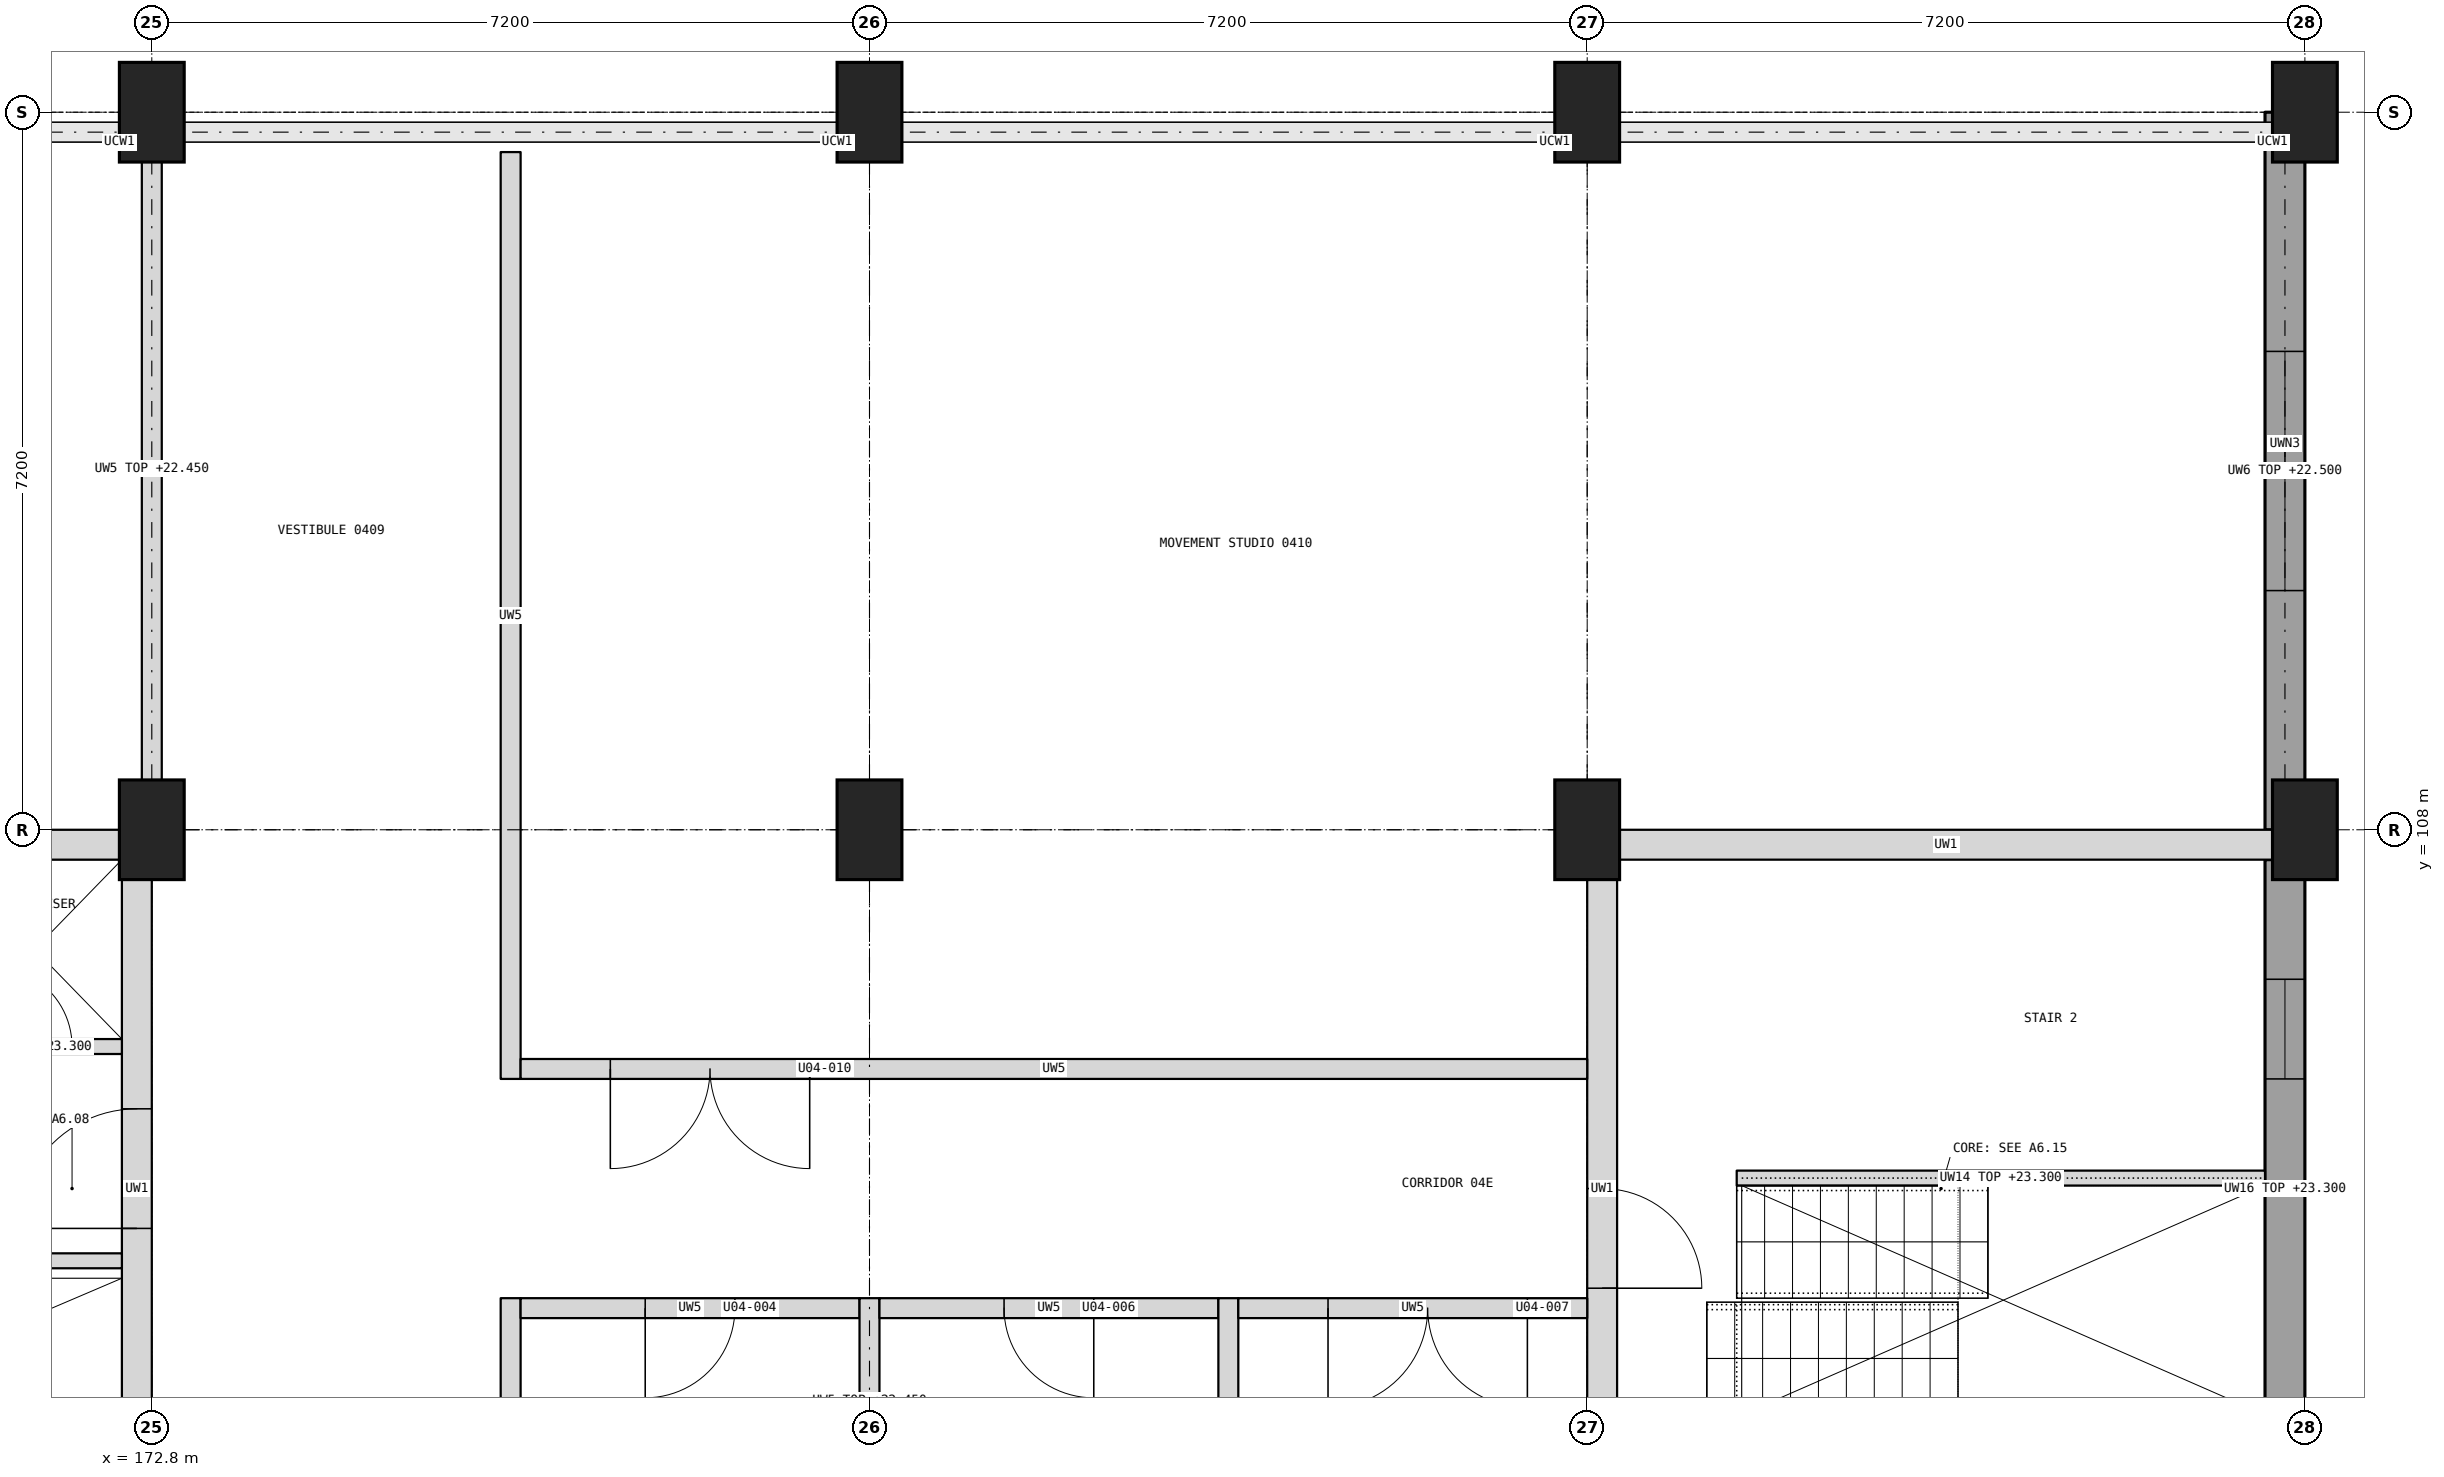
"""IFC4 building model, lengths in metres.
Left out: names, types, materials, properties, quantities, classifications, styles, units other than length and angle.
Written with IfcOpenShell. Run it as: python <this file> out.ifc"""

import sys

from ifc_helpers import new_model, si_unit, direction, frame, frame_2d, origin, origin_2d, place, context, subcontext, project, spatial, rectangle, extrude, element, fill, save


model = new_model("IFC4")
c1 = context("Model", 3, precision=1e-05, world=origin(), true_north=direction((0.0, 1.0)))
c2 = subcontext(c1, "Body", "Model", "MODEL_VIEW")
j1 = project(units=[si_unit("LENGTHUNIT", "METRE"), si_unit("PLANEANGLEUNIT", "RADIAN")], contexts=[c1])
p1 = place(None, origin())
s1 = spatial("IfcSite", under=j1, at=p1, CompositionType="ELEMENT")
p2 = place(p1, origin())
s2 = spatial("IfcBuilding", under=s1, at=p2, CompositionType="ELEMENT")
p3 = place(p2, frame((0.0, 0.0, 19.9)))
s3 = spatial("IfcBuildingStorey", under=s2, at=p3, CompositionType="ELEMENT", Elevation=19.9)
for number, where, z_axis, x_axis in (
    (1, (172.8, 108.0, 0.0), (0.0, 0.0, 1.0), (1.0, 0.0, 0.0)),
    (2, (172.8, 115.2, 0.0), (0.0, 0.0, 1.0), (1.0, 0.0, 0.0)),
    (3, (180.0, 108.0, 0.0), (0.0, 0.0, 1.0), (1.0, 0.0, 0.0)),
    (4, (180.0, 115.2, 0.0), (0.0, 0.0, 1.0), (1.0, 0.0, 0.0)),
    (5, (187.2, 108.0, 0.0), (0.0, 0.0, 1.0), (1.0, 0.0, 0.0)),
    (6, (187.2, 115.2, 0.0), (0.0, 0.0, 1.0), (1.0, 0.0, 0.0)),
    (7, (194.4, 108.0, 0.0), (0.0, 0.0, 1.0), (1.0, 0.0, 0.0)),
    (8, (194.4, 115.2, 0.0), (0.0, 0.0, 1.0), (1.0, 0.0, 0.0)),
):
    element("IfcColumn", number, at=place(p3, frame(where, z_axis=z_axis, x_axis=x_axis)), inside=s3, PredefinedType="COLUMN", context=c2, shape_type="SweptSolid", body=[
        extrude(rectangle(XDim=0.65, YDim=1.0, at=origin_2d()), origin(), (0.0, 0.0, 1.0), 3.4),
    ])
p4 = place(p3, frame((158.4, 107.85, 0.0), z_axis=(0.0, 0.0, 1.0), x_axis=(1.0, 0.0, 0.0)))
e9 = element("IfcWall", 9, at=p4, inside=s3, PredefinedType="SHEAR", context=c2, shape_type="SweptSolid", body=[
    extrude(rectangle(XDim=14.4, YDim=0.3, at=frame_2d((7.2, 0.0))), origin(), (0.0, 0.0, 1.0), 3.4),
])
p5 = place(p3, frame((172.65, 101.1, 0.0), z_axis=(0.0, 0.0, 1.0), x_axis=(0.0, 1.0, 0.0)))
e10 = element("IfcWall", 10, at=p5, inside=s3, PredefinedType="SHEAR", context=c2, shape_type="SweptSolid", body=[
    extrude(rectangle(XDim=6.6, YDim=0.3, at=frame_2d((3.3, 0.0))), origin(), (0.0, 0.0, 1.0), 3.4),
])
p6 = place(p5, frame((2.9, 0.0, 0.0)))
e11 = element("IfcOpeningElement", 11, at=p6, cuts=e10, PredefinedType="OPENING", context=c2, shape_type="SweptSolid", body=[
    extrude(rectangle(XDim=1.2, YDim=2.1, at=frame_2d((0.6, 1.05))), frame((0.0, 0.16, 0.0), z_axis=(0.0, -1.0, 0.0), x_axis=(1.0, 0.0, 0.0)), (0.0, 0.0, 1.0), 0.32),
])
p7 = place(p3, frame((165.75, 103.675, 0.0), z_axis=(0.0, 0.0, 1.0), x_axis=(1.0, 0.0, 0.0)))
e12 = element("IfcWall", 12, at=p7, inside=s3, PredefinedType="SHEAR", context=c2, shape_type="SweptSolid", body=[
    extrude(rectangle(XDim=6.75, YDim=0.15, at=frame_2d((3.375, 0.0))), origin(), (0.0, 0.0, 1.0), 3.4),
])
p8 = place(p7, frame((0.1, 0.0, 0.0)))
e13 = element("IfcOpeningElement", 13, at=p8, cuts=e12, PredefinedType="OPENING", context=c2, shape_type="SweptSolid", body=[
    extrude(rectangle(XDim=1.0, YDim=2.1, at=frame_2d((0.5, 1.05))), frame((0.0, 0.085, 0.0), z_axis=(0.0, -1.0, 0.0), x_axis=(1.0, 0.0, 0.0)), (0.0, 0.0, 1.0), 0.17),
])
p9 = place(p3, frame((170.75, 105.825, 0.0), z_axis=(0.0, 0.0, 1.0), x_axis=(1.0, 0.0, 0.0)))
e14 = element("IfcWall", 14, at=p9, inside=s3, PredefinedType="PARTITIONING", context=c2, shape_type="SweptSolid", body=[
    extrude(rectangle(XDim=1.75, YDim=0.15, at=frame_2d((0.875, 0.0))), origin(), (0.0, 0.0, 1.0), 3.4),
])
p10 = place(p9, frame((0.45, 0.0, 0.0)))
e15 = element("IfcOpeningElement", 15, at=p10, cuts=e14, PredefinedType="OPENING", context=c2, shape_type="SweptSolid", body=[
    extrude(rectangle(XDim=0.8, YDim=2.1, at=frame_2d((0.4, 1.05))), frame((0.0, 0.085, 0.0), z_axis=(0.0, -1.0, 0.0), x_axis=(1.0, 0.0, 0.0)), (0.0, 0.0, 1.0), 0.17),
])
p11 = place(p3, frame((194.4, 107.85, 0.0), z_axis=(0.0, 0.0, 1.0), x_axis=(-1.0, 0.0, 0.0)))
e16 = element("IfcWall", 16, at=p11, inside=s3, PredefinedType="SHEAR", context=c2, shape_type="SweptSolid", body=[
    extrude(rectangle(XDim=7.2, YDim=0.3, at=frame_2d((3.6, 0.0))), origin(), (0.0, 0.0, 1.0), 3.4),
])
p12 = place(p3, frame((187.35, 101.1, 0.0), z_axis=(0.0, 0.0, 1.0), x_axis=(0.0, 1.0, 0.0)))
e17 = element("IfcWall", 17, at=p12, inside=s3, PredefinedType="SHEAR", context=c2, shape_type="SweptSolid", body=[
    extrude(rectangle(XDim=6.6, YDim=0.3, at=frame_2d((3.3, 0.0))), origin(), (0.0, 0.0, 1.0), 3.4),
])
p13 = place(p12, frame((2.3, 0.0, 0.0)))
e18 = element("IfcOpeningElement", 18, at=p13, cuts=e17, PredefinedType="OPENING", context=c2, shape_type="SweptSolid", body=[
    extrude(rectangle(XDim=1.0, YDim=2.1, at=frame_2d((0.5, 1.05))), frame((0.0, 0.16, 0.0), z_axis=(0.0, -1.0, 0.0), x_axis=(1.0, 0.0, 0.0)), (0.0, 0.0, 1.0), 0.32),
])
p14 = place(p3, frame((194.2, 101.1, 0.0), z_axis=(0.0, 0.0, 1.0), x_axis=(0.0, 1.0, 0.0)))
e19 = element("IfcWall", 19, at=p14, inside=s3, PredefinedType="SHEAR", context=c2, shape_type="SweptSolid", body=[
    extrude(rectangle(XDim=6.6, YDim=0.4, at=frame_2d((3.3, 0.0))), origin(), (0.0, 0.0, 1.0), 3.4),
])
p15 = place(p14, frame((4.4, 0.0, 1.0)))
e20 = element("IfcOpeningElement", 20, at=p15, cuts=e19, PredefinedType="OPENING", context=c2, shape_type="SweptSolid", body=[
    extrude(rectangle(XDim=1.0, YDim=1.5, at=frame_2d((0.5, 0.75))), frame((0.0, 0.21, 0.0), z_axis=(0.0, -1.0, 0.0), x_axis=(1.0, 0.0, 0.0)), (0.0, 0.0, 1.0), 0.42),
])
p16 = place(p3, frame((188.7, 104.505, 0.0), z_axis=(0.0, 0.0, 1.0), x_axis=(1.0, 0.0, 0.0)))
e21 = element("IfcWall", 21, at=p16, inside=s3, PredefinedType="SHEAR", context=c2, shape_type="SweptSolid", body=[
    extrude(rectangle(XDim=5.3, YDim=0.15, at=frame_2d((2.65, 0.0))), origin(), (0.0, 0.0, 1.0), 3.4),
])
p17 = place(p3, frame((194.2, 108.0, 0.0), z_axis=(0.0, 0.0, 1.0), x_axis=(0.0, 1.0, 0.0)))
e22 = element("IfcWall", 22, at=p17, inside=s3, PredefinedType="SOLIDWALL", context=c2, shape_type="SweptSolid", body=[
    extrude(rectangle(XDim=7.2, YDim=0.4, at=frame_2d((3.6, 0.0))), origin(), (0.0, 0.0, 1.0), 2.6),
])
p18 = place(p17, frame((2.4, 0.0, 0.9)))
e23 = element("IfcOpeningElement", 23, at=p18, cuts=e22, PredefinedType="OPENING", context=c2, shape_type="SweptSolid", body=[
    extrude(rectangle(XDim=2.4, YDim=1.5, at=frame_2d((1.2, 0.75))), frame((0.0, 0.21, 0.0), z_axis=(0.0, -1.0, 0.0), x_axis=(1.0, 0.0, 0.0)), (0.0, 0.0, 1.0), 0.42),
])
p19 = place(p3, frame((176.4, 94.0, 0.0), z_axis=(0.0, 0.0, 1.0), x_axis=(0.0, 1.0, 0.0)))
e24 = element("IfcWall", 24, at=p19, inside=s3, PredefinedType="PARTITIONING", context=c2, shape_type="SweptSolid", body=[
    extrude(rectangle(XDim=9.3, YDim=0.2, at=frame_2d((4.65, 0.0))), origin(), (0.0, 0.0, 1.0), 3.1),
])
p20 = place(p3, frame((176.5, 103.2, 0.0), z_axis=(0.0, 0.0, 1.0), x_axis=(1.0, 0.0, 0.0)))
e25 = element("IfcWall", 25, at=p20, inside=s3, PredefinedType="PARTITIONING", context=c2, shape_type="SweptSolid", body=[
    extrude(rectangle(XDim=3.4, YDim=0.2, at=frame_2d((1.7, 0.0))), origin(), (0.0, 0.0, 1.0), 3.1),
])
p21 = place(p20, frame((1.25, 0.0, 0.0)))
e26 = element("IfcOpeningElement", 26, at=p21, cuts=e25, PredefinedType="OPENING", context=c2, shape_type="SweptSolid", body=[
    extrude(rectangle(XDim=0.9, YDim=2.1, at=frame_2d((0.45, 1.05))), frame((0.0, 0.11, 0.0), z_axis=(0.0, -1.0, 0.0), x_axis=(1.0, 0.0, 0.0)), (0.0, 0.0, 1.0), 0.22),
])
p22 = place(p3, frame((180.0, 101.25, 0.0), z_axis=(0.0, 0.0, 1.0), x_axis=(0.0, 1.0, 0.0)))
e27 = element("IfcWall", 27, at=p22, inside=s3, PredefinedType="PARTITIONING", context=c2, shape_type="SweptSolid", body=[
    extrude(rectangle(XDim=2.05, YDim=0.2, at=frame_2d((1.025, 0.0))), origin(), (0.0, 0.0, 1.0), 2.55),
])
p23 = place(p3, frame((180.1, 103.2, 0.0), z_axis=(0.0, 0.0, 1.0), x_axis=(1.0, 0.0, 0.0)))
e28 = element("IfcWall", 28, at=p23, inside=s3, PredefinedType="PARTITIONING", context=c2, shape_type="SweptSolid", body=[
    extrude(rectangle(XDim=3.4, YDim=0.2, at=frame_2d((1.7, 0.0))), origin(), (0.0, 0.0, 1.0), 3.1),
])
p24 = place(p23, frame((1.25, 0.0, 0.0)))
e29 = element("IfcOpeningElement", 29, at=p24, cuts=e28, PredefinedType="OPENING", context=c2, shape_type="SweptSolid", body=[
    extrude(rectangle(XDim=0.9, YDim=2.1, at=frame_2d((0.45, 1.05))), frame((0.0, 0.11, 0.0), z_axis=(0.0, -1.0, 0.0), x_axis=(1.0, 0.0, 0.0)), (0.0, 0.0, 1.0), 0.22),
])
p25 = place(p3, frame((183.6, 94.0, 0.0), z_axis=(0.0, 0.0, 1.0), x_axis=(0.0, 1.0, 0.0)))
e30 = element("IfcWall", 30, at=p25, inside=s3, PredefinedType="PARTITIONING", context=c2, shape_type="SweptSolid", body=[
    extrude(rectangle(XDim=9.3, YDim=0.2, at=frame_2d((4.65, 0.0))), origin(), (0.0, 0.0, 1.0), 3.1),
])
p26 = place(p3, frame((183.7, 103.2, 0.0), z_axis=(0.0, 0.0, 1.0), x_axis=(1.0, 0.0, 0.0)))
e31 = element("IfcWall", 31, at=p26, inside=s3, PredefinedType="PARTITIONING", context=c2, shape_type="SweptSolid", body=[
    extrude(rectangle(XDim=3.5, YDim=0.2, at=frame_2d((1.75, 0.0))), origin(), (0.0, 0.0, 1.0), 3.1),
])
p27 = place(p26, frame((0.9, 0.0, 0.0)))
e32 = element("IfcOpeningElement", 32, at=p27, cuts=e31, PredefinedType="OPENING", context=c2, shape_type="SweptSolid", body=[
    extrude(rectangle(XDim=2.0, YDim=2.1, at=frame_2d((1.0, 1.05))), frame((0.0, 0.11, 0.0), z_axis=(0.0, -1.0, 0.0), x_axis=(1.0, 0.0, 0.0)), (0.0, 0.0, 1.0), 0.22),
])
p28 = place(p3, frame((172.8, 108.45, 0.0), z_axis=(0.0, 0.0, 1.0), x_axis=(0.0, 1.0, 0.0)))
e33 = element("IfcWall", 33, at=p28, inside=s3, PredefinedType="PARTITIONING", context=c2, shape_type="SweptSolid", body=[
    extrude(rectangle(XDim=6.35, YDim=0.2, at=frame_2d((3.175, 0.0))), origin(), (0.0, 0.0, 1.0), 2.55),
])
p29 = place(p3, frame((176.4, 105.5, 0.0), z_axis=(0.0, 0.0, 1.0), x_axis=(0.0, 1.0, 0.0)))
e34 = element("IfcWall", 34, at=p29, inside=s3, PredefinedType="PARTITIONING", context=c2, shape_type="SweptSolid", body=[
    extrude(rectangle(XDim=9.3, YDim=0.2, at=frame_2d((4.65, 0.0))), origin(), (0.0, 0.0, 1.0), 3.1),
])
p30 = place(p3, frame((176.5, 105.6, 0.0), z_axis=(0.0, 0.0, 1.0), x_axis=(1.0, 0.0, 0.0)))
e35 = element("IfcWall", 35, at=p30, inside=s3, PredefinedType="PARTITIONING", context=c2, shape_type="SweptSolid", body=[
    extrude(rectangle(XDim=10.7, YDim=0.2, at=frame_2d((5.35, 0.0))), origin(), (0.0, 0.0, 1.0), 3.1),
])
p31 = place(p30, frame((0.9, 0.0, 0.0)))
e36 = element("IfcOpeningElement", 36, at=p31, cuts=e35, PredefinedType="OPENING", context=c2, shape_type="SweptSolid", body=[
    extrude(rectangle(XDim=2.0, YDim=2.1, at=frame_2d((1.0, 1.05))), frame((0.0, 0.11, 0.0), z_axis=(0.0, -1.0, 0.0), x_axis=(1.0, 0.0, 0.0)), (0.0, 0.0, 1.0), 0.22),
])
p32 = place(p18, origin())
e37 = element("IfcWindow", 37, at=p32, inside=s3, PartitioningType="DOUBLE_PANEL_VERTICAL", PredefinedType="WINDOW", context=c2, shape_type="SweptSolid", body=[
    extrude(rectangle(XDim=2.4, YDim=1.5, at=frame_2d((1.2, 0.75))), frame((0.0, 0.03, 0.0), z_axis=(0.0, -1.0, 0.0), x_axis=(1.0, 0.0, 0.0)), (0.0, 0.0, 1.0), 0.06),
])
fill(e23, e37)
p33 = place(p15, origin())
e38 = element("IfcWindow", 38, at=p33, inside=s3, PartitioningType="SINGLE_PANEL", PredefinedType="WINDOW", context=c2, shape_type="SweptSolid", body=[
    extrude(rectangle(XDim=1.0, YDim=1.5, at=frame_2d((0.5, 0.75))), frame((0.0, 0.03, 0.0), z_axis=(0.0, -1.0, 0.0), x_axis=(1.0, 0.0, 0.0)), (0.0, 0.0, 1.0), 0.06),
])
fill(e20, e38)
p34 = place(p21, frame((0.9, 0.0, 0.0), z_axis=(0.0, 0.0, 1.0), x_axis=(-1.0, 0.0, 0.0)))
e39 = element("IfcDoor", 39, at=p34, inside=s3, OperationType="SINGLE_SWING_RIGHT", PredefinedType="DOOR", context=c2, shape_type="SweptSolid", body=[
    extrude(rectangle(XDim=0.9, YDim=2.1, at=frame_2d((0.45, 1.05))), frame((0.0, 0.025, 0.0), z_axis=(0.0, -1.0, 0.0), x_axis=(1.0, 0.0, 0.0)), (0.0, 0.0, 1.0), 0.05),
])
fill(e26, e39)
p35 = place(p24, frame((0.9, 0.0, 0.0), z_axis=(0.0, 0.0, 1.0), x_axis=(-1.0, 0.0, 0.0)))
e40 = element("IfcDoor", 40, at=p35, inside=s3, OperationType="SINGLE_SWING_LEFT", PredefinedType="DOOR", context=c2, shape_type="SweptSolid", body=[
    extrude(rectangle(XDim=0.9, YDim=2.1, at=frame_2d((0.45, 1.05))), frame((0.0, 0.025, 0.0), z_axis=(0.0, -1.0, 0.0), x_axis=(1.0, 0.0, 0.0)), (0.0, 0.0, 1.0), 0.05),
])
fill(e29, e40)
p36 = place(p27, frame((2.0, 0.0, 0.0), z_axis=(0.0, 0.0, 1.0), x_axis=(-1.0, 0.0, 0.0)))
e41 = element("IfcDoor", 41, at=p36, inside=s3, OperationType="DOUBLE_DOOR_SINGLE_SWING", PredefinedType="DOOR", context=c2, shape_type="SweptSolid", body=[
    extrude(rectangle(XDim=2.0, YDim=2.1, at=frame_2d((1.0, 1.05))), frame((0.0, 0.025, 0.0), z_axis=(0.0, -1.0, 0.0), x_axis=(1.0, 0.0, 0.0)), (0.0, 0.0, 1.0), 0.05),
])
fill(e32, e41)
p37 = place(p31, frame((2.0, 0.0, 0.0), z_axis=(0.0, 0.0, 1.0), x_axis=(-1.0, 0.0, 0.0)))
e42 = element("IfcDoor", 42, at=p37, inside=s3, OperationType="DOUBLE_DOOR_SINGLE_SWING", PredefinedType="DOOR", context=c2, shape_type="SweptSolid", body=[
    extrude(rectangle(XDim=2.0, YDim=2.1, at=frame_2d((1.0, 1.05))), frame((0.0, 0.025, 0.0), z_axis=(0.0, -1.0, 0.0), x_axis=(1.0, 0.0, 0.0)), (0.0, 0.0, 1.0), 0.05),
])
fill(e36, e42)
p38 = place(p6, origin())
e43 = element("IfcDoor", 43, at=p38, inside=s3, OperationType="SINGLE_SWING_LEFT", PredefinedType="DOOR", context=c2, shape_type="SweptSolid", body=[
    extrude(rectangle(XDim=1.2, YDim=2.1, at=frame_2d((0.6, 1.05))), frame((0.0, 0.025, 0.0), z_axis=(0.0, -1.0, 0.0), x_axis=(1.0, 0.0, 0.0)), (0.0, 0.0, 1.0), 0.05),
])
fill(e11, e43)
p39 = place(p10, origin())
e44 = element("IfcDoor", 44, at=p39, inside=s3, OperationType="SINGLE_SWING_LEFT", PredefinedType="DOOR", context=c2, shape_type="SweptSolid", body=[
    extrude(rectangle(XDim=0.8, YDim=2.1, at=frame_2d((0.4, 1.05))), frame((0.0, 0.025, 0.0), z_axis=(0.0, -1.0, 0.0), x_axis=(1.0, 0.0, 0.0)), (0.0, 0.0, 1.0), 0.05),
])
fill(e15, e44)
p40 = place(p13, frame((1.0, 0.0, 0.0), z_axis=(0.0, 0.0, 1.0), x_axis=(-1.0, 0.0, 0.0)))
e45 = element("IfcDoor", 45, at=p40, inside=s3, OperationType="SINGLE_SWING_RIGHT", PredefinedType="DOOR", context=c2, shape_type="SweptSolid", body=[
    extrude(rectangle(XDim=1.0, YDim=2.1, at=frame_2d((0.5, 1.05))), frame((0.0, 0.025, 0.0), z_axis=(0.0, -1.0, 0.0), x_axis=(1.0, 0.0, 0.0)), (0.0, 0.0, 1.0), 0.05),
])
fill(e18, e45)
save(model, sys.argv[1])
